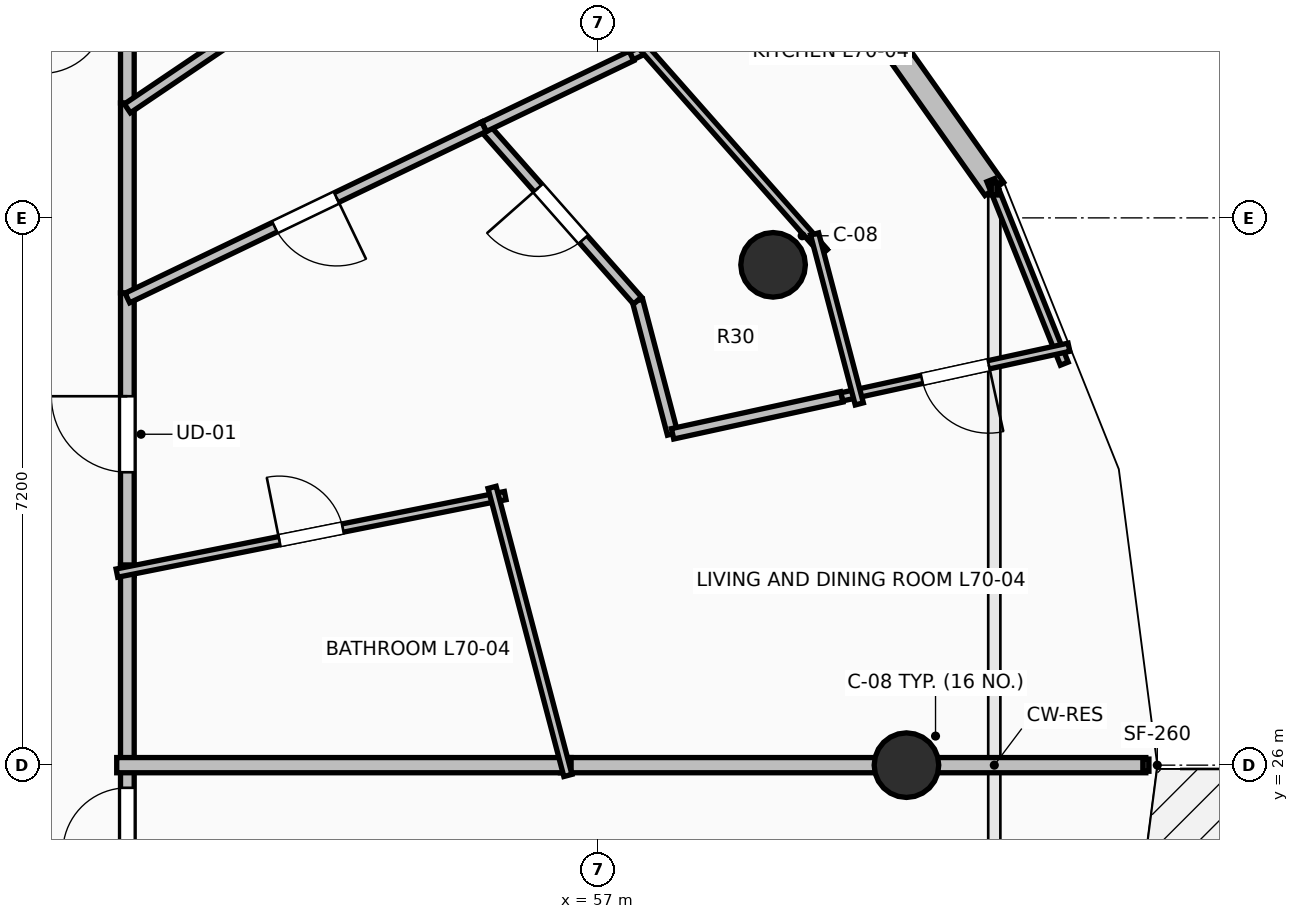
"""IFC4 building model, lengths in metres.
Left out: names, types, materials, properties, quantities, classifications, styles, units other than length and angle.
Written with IfcOpenShell. Run it as: python <this file> out.ifc"""

import sys

from ifc_helpers import new_model, si_unit, direction, frame, frame_2d, origin, origin_2d, place, context, subcontext, project, spatial, rectangle, circle, extrude, element, fill, save


model = new_model("IFC4")
c1 = context("Model", 3, precision=1e-05, world=origin(), true_north=direction((0.0, 1.0)))
c2 = subcontext(c1, "Body", "Model", "MODEL_VIEW")
j1 = project(units=[si_unit("LENGTHUNIT", "METRE"), si_unit("PLANEANGLEUNIT", "RADIAN")], contexts=[c1])
p1 = place(None, origin())
s1 = spatial("IfcSite", under=j1, at=p1, CompositionType="ELEMENT")
p2 = place(p1, origin())
s2 = spatial("IfcBuilding", under=s1, at=p2, CompositionType="ELEMENT")
p3 = place(p2, frame((0.0, 0.0, 259.1)))
s3 = spatial("IfcBuildingStorey", under=s2, at=p3, CompositionType="ELEMENT", Elevation=259.1)
for number, where, z_axis, x_axis in (
    (1, (61.05, 26.0, 0.0), (0.0, 0.0, 1.0), (1.0, 0.0, 0.0)),
    (2, (59.295, 32.582, 0.0), (0.0, 0.0, 1.0), (0.924, 0.383, 0.0)),
):
    element("IfcColumn", number, at=place(p3, frame(where, z_axis=z_axis, x_axis=x_axis)), inside=s3, PredefinedType="COLUMN", context=c2, shape_type="SweptSolid", body=[
        extrude(circle(Radius=0.425, at=origin_2d()), origin(), (0.0, 0.0, 1.0), 3.55),
    ])
p4 = place(p3, frame((62.206, 33.581, 0.0), z_axis=(0.0, 0.0, 1.0), x_axis=(-0.577261247247, 0.816559521668, 0.0)))
e3 = element("IfcWall", 3, at=p4, inside=s3, PredefinedType="STANDARD", context=c2, shape_type="SweptSolid", body=[
    extrude(rectangle(XDim=4.194, YDim=0.3, at=frame_2d((2.097, 0.0))), origin(), (0.0, 0.0, 1.0), 3.29),
])
p5 = place(p3, frame((50.8, 24.494, 0.0), z_axis=(0.0, 0.0, 1.0), x_axis=(0.0, 1.0, 0.0)))
e4 = element("IfcWall", 4, at=p5, inside=s3, PredefinedType="PARTITIONING", context=c2, shape_type="SweptSolid", body=[
    extrude(rectangle(XDim=1.566, YDim=0.18, at=frame_2d((0.783, 0.0))), origin(), (0.0, 0.0, 1.0), 3.29),
])
p6 = place(p5, frame((0.358, 0.0, 0.0)))
e5 = element("IfcOpeningElement", 5, at=p6, cuts=e4, PredefinedType="OPENING", context=c2, shape_type="SweptSolid", body=[
    extrude(rectangle(XDim=0.85, YDim=2.1, at=frame_2d((0.425, 1.05))), frame((0.0, 0.105, 0.0), z_axis=(0.0, -1.0, 0.0), x_axis=(1.0, 0.0, 0.0)), (0.0, 0.0, 1.0), 0.21),
])
p7 = place(p3, frame((50.8, 28.494, 0.0), z_axis=(0.0, 0.0, 1.0), x_axis=(0.0, 1.0, 0.0)))
e6 = element("IfcWall", 6, at=p7, inside=s3, PredefinedType="PARTITIONING", context=c2, shape_type="SweptSolid", body=[
    extrude(rectangle(XDim=3.719, YDim=0.18, at=frame_2d((1.859, 0.0))), origin(), (0.0, 0.0, 1.0), 3.29),
])
p8 = place(p7, frame((1.36, 0.0, 0.0)))
e7 = element("IfcOpeningElement", 7, at=p8, cuts=e6, PredefinedType="OPENING", context=c2, shape_type="SweptSolid", body=[
    extrude(rectangle(XDim=1.0, YDim=2.15, at=frame_2d((0.5, 1.075))), frame((0.0, 0.105, 0.0), z_axis=(0.0, -1.0, 0.0), x_axis=(1.0, 0.0, 0.0)), (0.0, 0.0, 1.0), 0.21),
])
p9 = place(p3, frame((50.8, 25.92, 0.0), z_axis=(0.0, 0.0, 1.0), x_axis=(0.0, 1.0, 0.0)))
e8 = element("IfcWall", 8, at=p9, inside=s3, PredefinedType="PARTITIONING", context=c2, shape_type="SweptSolid", body=[
    extrude(rectangle(XDim=2.714, YDim=0.18, at=frame_2d((1.357, 0.0))), origin(), (0.0, 0.0, 1.0), 2.482),
])
p10 = place(p3, frame((50.8, 32.213, 0.0), z_axis=(0.0, 0.0, 1.0), x_axis=(0.0, 1.0, 0.0)))
e9 = element("IfcWall", 9, at=p10, inside=s3, PredefinedType="PARTITIONING", context=c2, shape_type="SweptSolid", body=[
    extrude(rectangle(XDim=2.499, YDim=0.18, at=frame_2d((1.25, 0.0))), origin(), (0.0, 0.0, 1.0), 2.482),
])
p11 = place(p3, frame((50.8, 34.712, 0.0), z_axis=(0.0, 0.0, 1.0), x_axis=(0.0, 1.0, 0.0)))
e10 = element("IfcWall", 10, at=p11, inside=s3, PredefinedType="PARTITIONING", context=c2, shape_type="SweptSolid", body=[
    extrude(rectangle(XDim=1.238, YDim=0.18, at=frame_2d((0.619, 0.0))), origin(), (0.0, 0.0, 1.0), 2.482),
])
p12 = place(p3, frame((64.199, 26.0, 0.0), z_axis=(0.0, 0.0, 1.0), x_axis=(-1.0, 0.0, 0.0)))
e11 = element("IfcWall", 11, at=p12, inside=s3, PredefinedType="PARTITIONING", context=c2, shape_type="SweptSolid", body=[
    extrude(rectangle(XDim=7.701, YDim=0.2, at=frame_2d((3.851, 0.0))), origin(), (0.0, 0.0, 1.0), 2.482),
])
p13 = place(p3, frame((56.638, 26.0, 0.0), z_axis=(0.0, 0.0, 1.0), x_axis=(-1.0, 0.0, 0.0)))
e12 = element("IfcWall", 12, at=p13, inside=s3, PredefinedType="PARTITIONING", context=c2, shape_type="SweptSolid", body=[
    extrude(rectangle(XDim=5.978, YDim=0.2, at=frame_2d((2.989, 0.0))), origin(), (0.0, 0.0, 1.0), 2.482),
])
p14 = place(p3, frame((50.663, 28.527, 0.0), z_axis=(0.0, 0.0, 1.0), x_axis=(0.980652709614, 0.195755620935, 0.0)))
e13 = element("IfcWall", 13, at=p14, inside=s3, PredefinedType="PARTITIONING", context=c2, shape_type="SweptSolid", body=[
    extrude(rectangle(XDim=5.209, YDim=0.11, at=frame_2d((2.605, 0.0))), origin(), (0.0, 0.0, 1.0), 2.936),
])
p15 = place(p14, frame((2.18, 0.0, 0.0)))
e14 = element("IfcOpeningElement", 14, at=p15, cuts=e13, PredefinedType="OPENING", context=c2, shape_type="SweptSolid", body=[
    extrude(rectangle(XDim=0.85, YDim=2.1, at=frame_2d((0.425, 1.05))), frame((0.0, 0.07, 0.0), z_axis=(0.0, -1.0, 0.0), x_axis=(1.0, 0.0, 0.0)), (0.0, 0.0, 1.0), 0.14),
])
p16 = place(p3, frame((55.598, 29.654, 0.0), z_axis=(0.0, 0.0, 1.0), x_axis=(0.25449329928, -0.967074537263, 0.0)))
e15 = element("IfcWall", 15, at=p16, inside=s3, PredefinedType="PARTITIONING", context=c2, shape_type="SweptSolid", body=[
    extrude(rectangle(XDim=3.919, YDim=0.11, at=frame_2d((1.959, 0.0))), origin(), (0.0, 0.0, 1.0), 2.482),
])
p17 = place(p3, frame((57.432, 35.33, 0.0), z_axis=(0.0, 0.0, 1.0), x_axis=(0.90133305384, 0.43312668592, 0.0)))
e16 = element("IfcWall", 16, at=p17, inside=s3, PredefinedType="PARTITIONING", context=c2, shape_type="SweptSolid", body=[
    extrude(rectangle(XDim=3.069, YDim=0.11, at=frame_2d((1.535, 0.0))), origin(), (0.0, 0.0, 1.0), 3.29),
])
p18 = place(p3, frame((63.126, 31.282, 0.0), z_axis=(0.0, 0.0, 1.0), x_axis=(-0.371940924939, 0.92825640227, 0.0)))
e17 = element("IfcWall", 17, at=p18, inside=s3, PredefinedType="PARTITIONING", context=c2, shape_type="SweptSolid", body=[
    extrude(rectangle(XDim=2.601, YDim=0.11, at=frame_2d((1.3, 0.0))), origin(), (0.0, 0.0, 1.0), 3.29),
])
p19 = place(p3, frame((63.188, 31.498, 0.0), z_axis=(0.0, 0.0, 1.0), x_axis=(-0.976993096252, -0.213270930688, 0.0)))
e18 = element("IfcWall", 18, at=p19, inside=s3, PredefinedType="PARTITIONING", context=c2, shape_type="SweptSolid", body=[
    extrude(rectangle(XDim=3.06, YDim=0.11, at=frame_2d((1.53, 0.0))), origin(), (0.0, 0.0, 1.0), 3.29),
])
p20 = place(p19, frame((1.08, 0.0, 0.0)))
e19 = element("IfcOpeningElement", 19, at=p20, cuts=e18, PredefinedType="OPENING", context=c2, shape_type="SweptSolid", body=[
    extrude(rectangle(XDim=0.9, YDim=2.1, at=frame_2d((0.45, 1.05))), frame((0.0, 0.07, 0.0), z_axis=(0.0, -1.0, 0.0), x_axis=(1.0, 0.0, 0.0)), (0.0, 0.0, 1.0), 0.14),
])
p21 = place(p3, frame((57.973, 30.359, 0.0), z_axis=(0.0, 0.0, 1.0), x_axis=(-0.254274526126, 0.967132082687, 0.0)))
e20 = element("IfcWall", 20, at=p21, inside=s3, PredefinedType="PARTITIONING", context=c2, shape_type="SweptSolid", body=[
    extrude(rectangle(XDim=1.813, YDim=0.14, at=frame_2d((0.906, 0.0))), origin(), (0.0, 0.0, 1.0), 3.29),
])
p22 = place(p3, frame((57.512, 32.112, 0.0), z_axis=(0.0, 0.0, 1.0), x_axis=(-0.662026430628, 0.749480490173, 0.0)))
e21 = element("IfcWall", 21, at=p22, inside=s3, PredefinedType="PARTITIONING", context=c2, shape_type="SweptSolid", body=[
    extrude(rectangle(XDim=3.051, YDim=0.14, at=frame_2d((1.526, 0.0))), origin(), (0.0, 0.0, 1.0), 2.482),
])
p23 = place(p22, frame((1.076, 0.0, 0.0)))
e22 = element("IfcOpeningElement", 22, at=p23, cuts=e21, PredefinedType="OPENING", context=c2, shape_type="SweptSolid", body=[
    extrude(rectangle(XDim=0.9, YDim=2.1, at=frame_2d((0.45, 1.05))), frame((0.0, 0.085, 0.0), z_axis=(0.0, -1.0, 0.0), x_axis=(1.0, 0.0, 0.0)), (0.0, 0.0, 1.0), 0.17),
])
p24 = place(p3, frame((55.492, 34.399, 0.0), z_axis=(0.0, 0.0, 1.0), x_axis=(0.901372521065, 0.433044545363, 0.0)))
e23 = element("IfcWall", 23, at=p24, inside=s3, PredefinedType="PARTITIONING", context=c2, shape_type="SweptSolid", body=[
    extrude(rectangle(XDim=2.152, YDim=0.14, at=frame_2d((1.076, 0.0))), origin(), (0.0, 0.0, 1.0), 2.874),
])
p25 = place(p3, frame((60.198, 30.845, 0.0), z_axis=(0.0, 0.0, 1.0), x_axis=(-0.976965000645, -0.213399595862, 0.0)))
e24 = element("IfcWall", 24, at=p25, inside=s3, PredefinedType="PARTITIONING", context=c2, shape_type="SweptSolid", body=[
    extrude(rectangle(XDim=2.278, YDim=0.14, at=frame_2d((1.139, 0.0))), origin(), (0.0, 0.0, 1.0), 2.874),
])
p26 = place(p3, frame((55.492, 34.399, 0.0), z_axis=(0.0, 0.0, 1.0), x_axis=(-0.901416162018, -0.432953695968, 0.0)))
e25 = element("IfcWall", 25, at=p26, inside=s3, PredefinedType="PARTITIONING", context=c2, shape_type="SweptSolid", body=[
    extrude(rectangle(XDim=5.205, YDim=0.14, at=frame_2d((2.603, 0.0))), origin(), (0.0, 0.0, 1.0), 2.482),
])
p27 = place(p26, frame((2.152, 0.0, 0.0)))
e26 = element("IfcOpeningElement", 26, at=p27, cuts=e25, PredefinedType="OPENING", context=c2, shape_type="SweptSolid", body=[
    extrude(rectangle(XDim=0.9, YDim=2.1, at=frame_2d((0.45, 1.05))), frame((0.0, 0.085, 0.0), z_axis=(0.0, -1.0, 0.0), x_axis=(1.0, 0.0, 0.0)), (0.0, 0.0, 1.0), 0.17),
])
p28 = place(p3, frame((57.519, 35.522, 0.0), z_axis=(0.0, 0.0, 1.0), x_axis=(0.662055665853, -0.749454665281, 0.0)))
e27 = element("IfcWall", 27, at=p28, inside=s3, PredefinedType="PARTITIONING", context=c2, shape_type="SweptSolid", body=[
    extrude(rectangle(XDim=3.701, YDim=0.11, at=frame_2d((1.851, 0.0))), origin(), (0.0, 0.0, 1.0), 3.29),
])
p29 = place(p3, frame((59.841, 32.988, 0.0), z_axis=(0.0, 0.0, 1.0), x_axis=(0.254519291204, -0.967067696909, 0.0)))
e28 = element("IfcWall", 28, at=p29, inside=s3, PredefinedType="PARTITIONING", context=c2, shape_type="SweptSolid", body=[
    extrude(rectangle(XDim=2.312, YDim=0.11, at=frame_2d((1.156, 0.0))), origin(), (0.0, 0.0, 1.0), 3.29),
])
p30 = place(p3, frame((57.466, 39.14, 0.0), z_axis=(0.0, 0.0, 1.0), x_axis=(-0.828823335801, -0.559510391352, 0.0)))
e29 = element("IfcWall", 29, at=p30, inside=s3, PredefinedType="PARTITIONING", context=c2, shape_type="SweptSolid", body=[
    extrude(rectangle(XDim=8.043, YDim=0.14, at=frame_2d((4.021, 0.0))), origin(), (0.0, 0.0, 1.0), 2.482),
])
p31 = place(p8, origin())
e30 = element("IfcDoor", 30, at=p31, inside=s3, OperationType="SINGLE_SWING_RIGHT", PredefinedType="DOOR", context=c2, shape_type="SweptSolid", body=[
    extrude(rectangle(XDim=1.0, YDim=2.15, at=frame_2d((0.5, 1.075))), frame((0.0, 0.025, 0.0), z_axis=(0.0, -1.0, 0.0), x_axis=(1.0, 0.0, 0.0)), (0.0, 0.0, 1.0), 0.05),
])
fill(e7, e30)
p32 = place(p15, origin())
e31 = element("IfcDoor", 31, at=p32, inside=s3, OperationType="SINGLE_SWING_LEFT", PredefinedType="DOOR", context=c2, shape_type="SweptSolid", body=[
    extrude(rectangle(XDim=0.85, YDim=2.1, at=frame_2d((0.425, 1.05))), frame((0.0, 0.025, 0.0), z_axis=(0.0, -1.0, 0.0), x_axis=(1.0, 0.0, 0.0)), (0.0, 0.0, 1.0), 0.05),
])
fill(e14, e31)
p33 = place(p20, origin())
e32 = element("IfcDoor", 32, at=p33, inside=s3, OperationType="SINGLE_SWING_LEFT", PredefinedType="DOOR", context=c2, shape_type="SweptSolid", body=[
    extrude(rectangle(XDim=0.9, YDim=2.1, at=frame_2d((0.45, 1.05))), frame((0.0, 0.025, 0.0), z_axis=(0.0, -1.0, 0.0), x_axis=(1.0, 0.0, 0.0)), (0.0, 0.0, 1.0), 0.05),
])
fill(e19, e32)
p34 = place(p23, origin())
e33 = element("IfcDoor", 33, at=p34, inside=s3, OperationType="SINGLE_SWING_RIGHT", PredefinedType="DOOR", context=c2, shape_type="SweptSolid", body=[
    extrude(rectangle(XDim=0.9, YDim=2.1, at=frame_2d((0.45, 1.05))), frame((0.0, 0.025, 0.0), z_axis=(0.0, -1.0, 0.0), x_axis=(1.0, 0.0, 0.0)), (0.0, 0.0, 1.0), 0.05),
])
fill(e22, e33)
p35 = place(p27, origin())
e34 = element("IfcDoor", 34, at=p35, inside=s3, OperationType="SINGLE_SWING_LEFT", PredefinedType="DOOR", context=c2, shape_type="SweptSolid", body=[
    extrude(rectangle(XDim=0.9, YDim=2.1, at=frame_2d((0.45, 1.05))), frame((0.0, 0.025, 0.0), z_axis=(0.0, -1.0, 0.0), x_axis=(1.0, 0.0, 0.0)), (0.0, 0.0, 1.0), 0.05),
])
fill(e26, e34)
p36 = place(p6, origin())
e35 = element("IfcDoor", 35, at=p36, inside=s3, OperationType="SINGLE_SWING_LEFT", PredefinedType="DOOR", context=c2, shape_type="SweptSolid", body=[
    extrude(rectangle(XDim=0.85, YDim=2.1, at=frame_2d((0.425, 1.05))), frame((0.0, 0.025, 0.0), z_axis=(0.0, -1.0, 0.0), x_axis=(1.0, 0.0, 0.0)), (0.0, 0.0, 1.0), 0.05),
])
fill(e5, e35)
save(model, sys.argv[1])
